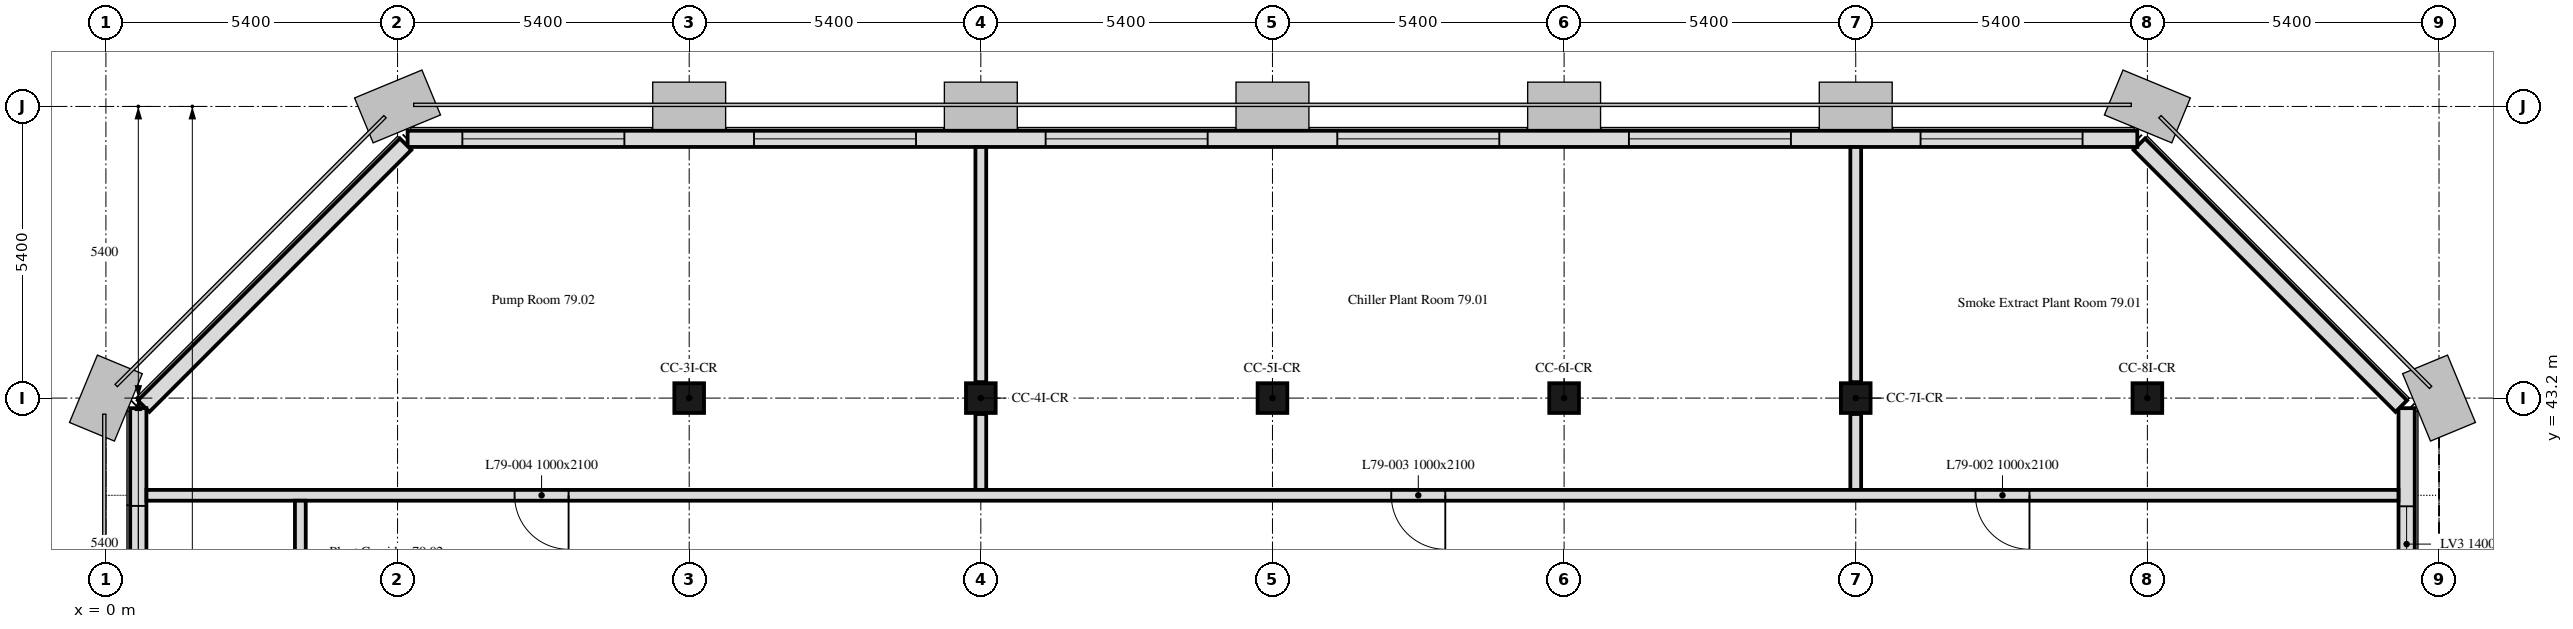
"""IFC4 building model, lengths in metres.
Left out: names, types, materials, properties, quantities, classifications, styles, units other than length and angle.
Written with IfcOpenShell. Run it as: python <this file> out.ifc"""

import sys

from ifc_helpers import new_model, si_unit, direction, frame, frame_2d, origin, origin_2d, place, context, subcontext, project, spatial, polyline, rectangle, outline, extrude, element, fill, save


model = new_model("IFC4")
c1 = context("Model", 3, precision=1e-05, world=origin(), true_north=direction((0.0, 1.0)))
c2 = subcontext(c1, "Body", "Model", "MODEL_VIEW")
j1 = project(units=[si_unit("LENGTHUNIT", "METRE"), si_unit("PLANEANGLEUNIT", "RADIAN")], contexts=[c1])
p1 = place(None, origin())
s1 = spatial("IfcSite", under=j1, at=p1, CompositionType="ELEMENT")
p2 = place(p1, origin())
s2 = spatial("IfcBuilding", under=s1, at=p2, CompositionType="ELEMENT")
p3 = place(p2, frame((0.0, 0.0, 317.2)))
s3 = spatial("IfcBuildingStorey", under=s2, at=p3, CompositionType="ELEMENT", Elevation=317.2)
for number, where, z_axis, x_axis in (
    (1, (10.8, 43.2, 0.0), (0.0, 0.0, 1.0), (1.0, 0.0, 0.0)),
    (2, (16.2, 43.2, 0.0), (0.0, 0.0, 1.0), (1.0, 0.0, 0.0)),
    (3, (21.6, 43.2, 0.0), (0.0, 0.0, 1.0), (1.0, 0.0, 0.0)),
    (4, (27.0, 43.2, 0.0), (0.0, 0.0, 1.0), (1.0, 0.0, 0.0)),
    (5, (32.4, 43.2, 0.0), (0.0, 0.0, 1.0), (1.0, 0.0, 0.0)),
    (6, (37.8, 43.2, 0.0), (0.0, 0.0, 1.0), (1.0, 0.0, 0.0)),
):
    element("IfcColumn", number, at=place(p3, frame(where, z_axis=z_axis, x_axis=x_axis)), inside=s3, PredefinedType="COLUMN", context=c2, shape_type="SweptSolid", body=[
        extrude(rectangle(XDim=0.55, YDim=0.55, at=origin_2d()), origin(), (0.0, 0.0, 1.0), 4.2),
    ])
p4 = place(p3, frame((42.6, 32.4, 0.0), z_axis=(0.0, 0.0, 1.0), x_axis=(0.0, 1.0, 0.0)))
e7 = element("IfcWall", 7, at=p4, inside=s3, PredefinedType="SOLIDWALL", context=c2, shape_type="SweptSolid", body=[
    extrude(outline(polyline([(0.0, 0.0), (10.614, 0.0), (10.614, 4.2), (10.024, 4.2), (9.434, 4.2), (8.845, 4.2), (8.255, 4.2), (7.665, 4.2), (7.076, 4.2), (6.486, 4.2), (5.896, 4.2), (5.307, 4.2), (4.717, 4.2), (4.127, 4.2), (3.538, 4.2), (2.948, 4.2), (2.359, 4.2), (1.769, 4.2), (1.179, 4.2), (0.59, 4.2), (0.0, 4.2), (0.0, 0.0)])), frame((0.0, 0.15, 0.0), z_axis=(0.0, -1.0, 0.0), x_axis=(1.0, 0.0, 0.0)), (0.0, 0.0, 1.0), 0.3),
])
p5 = place(p4, frame((1.2, 0.0, 0.6)))
e8 = element("IfcOpeningElement", 8, at=p5, cuts=e7, PredefinedType="OPENING", context=c2, shape_type="SweptSolid", body=[
    extrude(rectangle(XDim=3.0, YDim=1.8, at=frame_2d((1.5, 0.9))), frame((0.0, 0.16, 0.0), z_axis=(0.0, -1.0, 0.0), x_axis=(1.0, 0.0, 0.0)), (0.0, 0.0, 1.0), 0.32),
])
p6 = place(p4, frame((7.396, 0.0, 0.6)))
e9 = element("IfcOpeningElement", 9, at=p6, cuts=e7, PredefinedType="OPENING", context=c2, shape_type="SweptSolid", body=[
    extrude(rectangle(XDim=1.4, YDim=1.8, at=frame_2d((0.7, 0.9))), frame((0.0, 0.16, 0.0), z_axis=(0.0, -1.0, 0.0), x_axis=(1.0, 0.0, 0.0)), (0.0, 0.0, 1.0), 0.32),
])
p7 = place(p3, frame((42.501, 43.051, 0.0), z_axis=(0.0, 0.0, 1.0), x_axis=(-0.707106781187, 0.707106781187, 0.0)))
e10 = element("IfcWall", 10, at=p7, inside=s3, PredefinedType="SOLIDWALL", context=c2, shape_type="SweptSolid", body=[
    extrude(outline(polyline([(0.0, 0.0), (6.86, 0.0), (6.86, 4.2), (6.288, 4.2), (5.716, 4.2), (5.145, 4.2), (4.573, 4.2), (4.001, 4.2), (3.43, 4.2), (2.858, 4.2), (2.287, 4.2), (1.715, 4.2), (1.143, 4.2), (0.572, 4.2), (0.0, 4.2), (0.0, 0.0)])), frame((0.0, 0.15, 0.0), z_axis=(0.0, -1.0, 0.0), x_axis=(1.0, 0.0, 0.0)), (0.0, 0.0, 1.0), 0.3),
])
p8 = place(p3, frame((37.614, 48.0, 0.0), z_axis=(0.0, 0.0, 1.0), x_axis=(-1.0, 0.0, 0.0)))
e11 = element("IfcWall", 11, at=p8, inside=s3, PredefinedType="SOLIDWALL", context=c2, shape_type="SweptSolid", body=[
    extrude(outline(polyline([(0.0, 0.0), (32.027, 0.0), (32.027, 4.2), (31.434, 4.2), (30.841, 4.2), (30.248, 4.2), (29.655, 4.2), (29.062, 4.2), (28.469, 4.2), (27.875, 4.2), (27.282, 4.2), (26.689, 4.2), (26.096, 4.2), (25.503, 4.2), (24.91, 4.2), (24.317, 4.2), (23.724, 4.2), (23.131, 4.2), (22.538, 4.2), (21.945, 4.2), (21.352, 4.2), (20.758, 4.2), (20.165, 4.2), (19.572, 4.2), (18.979, 4.2), (18.386, 4.2), (17.793, 4.2), (17.2, 4.2), (16.607, 4.2), (16.014, 4.2), (15.42, 4.2), (14.827, 4.2), (14.234, 4.2), (13.641, 4.2), (13.048, 4.2), (12.455, 4.2), (11.862, 4.2), (11.269, 4.2), (10.676, 4.2), (10.083, 4.2), (9.49, 4.2), (8.896, 4.2), (8.303, 4.2), (7.71, 4.2), (7.117, 4.2), (6.524, 4.2), (5.931, 4.2), (5.338, 4.2), (4.745, 4.2), (4.152, 4.2), (3.559, 4.2), (2.966, 4.2), (2.372, 4.2), (1.779, 4.2), (1.186, 4.2), (0.593, 4.2), (0.0, 4.2), (0.0, 0.0)])), frame((0.0, 0.15, 0.0), z_axis=(0.0, -1.0, 0.0), x_axis=(1.0, 0.0, 0.0)), (0.0, 0.0, 1.0), 0.3),
])
p9 = place(p8, frame((1.014, 0.0, 0.6)))
e12 = element("IfcOpeningElement", 12, at=p9, cuts=e11, PredefinedType="OPENING", context=c2, shape_type="SweptSolid", body=[
    extrude(rectangle(XDim=3.0, YDim=1.8, at=frame_2d((1.5, 0.9))), frame((0.0, 0.16, 0.0), z_axis=(0.0, -1.0, 0.0), x_axis=(1.0, 0.0, 0.0)), (0.0, 0.0, 1.0), 0.32),
])
p10 = place(p8, frame((6.414, 0.0, 0.6)))
e13 = element("IfcOpeningElement", 13, at=p10, cuts=e11, PredefinedType="OPENING", context=c2, shape_type="SweptSolid", body=[
    extrude(rectangle(XDim=3.0, YDim=1.8, at=frame_2d((1.5, 0.9))), frame((0.0, 0.16, 0.0), z_axis=(0.0, -1.0, 0.0), x_axis=(1.0, 0.0, 0.0)), (0.0, 0.0, 1.0), 0.32),
])
p11 = place(p8, frame((11.814, 0.0, 0.6)))
e14 = element("IfcOpeningElement", 14, at=p11, cuts=e11, PredefinedType="OPENING", context=c2, shape_type="SweptSolid", body=[
    extrude(rectangle(XDim=3.0, YDim=1.8, at=frame_2d((1.5, 0.9))), frame((0.0, 0.16, 0.0), z_axis=(0.0, -1.0, 0.0), x_axis=(1.0, 0.0, 0.0)), (0.0, 0.0, 1.0), 0.32),
])
p12 = place(p8, frame((17.214, 0.0, 0.6)))
e15 = element("IfcOpeningElement", 15, at=p12, cuts=e11, PredefinedType="OPENING", context=c2, shape_type="SweptSolid", body=[
    extrude(rectangle(XDim=3.0, YDim=1.8, at=frame_2d((1.5, 0.9))), frame((0.0, 0.16, 0.0), z_axis=(0.0, -1.0, 0.0), x_axis=(1.0, 0.0, 0.0)), (0.0, 0.0, 1.0), 0.32),
])
p13 = place(p8, frame((22.614, 0.0, 0.6)))
e16 = element("IfcOpeningElement", 16, at=p13, cuts=e11, PredefinedType="OPENING", context=c2, shape_type="SweptSolid", body=[
    extrude(rectangle(XDim=3.0, YDim=1.8, at=frame_2d((1.5, 0.9))), frame((0.0, 0.16, 0.0), z_axis=(0.0, -1.0, 0.0), x_axis=(1.0, 0.0, 0.0)), (0.0, 0.0, 1.0), 0.32),
])
p14 = place(p8, frame((28.014, 0.0, 0.6)))
e17 = element("IfcOpeningElement", 17, at=p14, cuts=e11, PredefinedType="OPENING", context=c2, shape_type="SweptSolid", body=[
    extrude(rectangle(XDim=3.0, YDim=1.8, at=frame_2d((1.5, 0.9))), frame((0.0, 0.16, 0.0), z_axis=(0.0, -1.0, 0.0), x_axis=(1.0, 0.0, 0.0)), (0.0, 0.0, 1.0), 0.32),
])
p15 = place(p3, frame((5.55, 47.901, 0.0), z_axis=(0.0, 0.0, 1.0), x_axis=(-0.707106781187, -0.707106781187, 0.0)))
e18 = element("IfcWall", 18, at=p15, inside=s3, PredefinedType="SOLIDWALL", context=c2, shape_type="SweptSolid", body=[
    extrude(outline(polyline([(0.0, 0.0), (6.86, 0.0), (6.86, 4.2), (6.288, 4.2), (5.716, 4.2), (5.145, 4.2), (4.573, 4.2), (4.001, 4.2), (3.43, 4.2), (2.858, 4.2), (2.287, 4.2), (1.715, 4.2), (1.143, 4.2), (0.572, 4.2), (0.0, 4.2), (0.0, 0.0)])), frame((0.0, 0.15, 0.0), z_axis=(0.0, -1.0, 0.0), x_axis=(1.0, 0.0, 0.0)), (0.0, 0.0, 1.0), 0.3),
])
p16 = place(p3, frame((0.6, 43.014, 0.0), z_axis=(0.0, 0.0, 1.0), x_axis=(0.0, -1.0, 0.0)))
e19 = element("IfcWall", 19, at=p16, inside=s3, PredefinedType="SOLIDWALL", context=c2, shape_type="SweptSolid", body=[
    extrude(outline(polyline([(0.0, 0.0), (32.027, 0.0), (32.027, 4.2), (31.434, 4.2), (30.841, 4.2), (30.248, 4.2), (29.655, 4.2), (29.062, 4.2), (28.469, 4.2), (27.875, 4.2), (27.282, 4.2), (26.689, 4.2), (26.096, 4.2), (25.503, 4.2), (24.91, 4.2), (24.317, 4.2), (23.724, 4.2), (23.131, 4.2), (22.538, 4.2), (21.945, 4.2), (21.352, 4.2), (20.758, 4.2), (20.165, 4.2), (19.572, 4.2), (18.979, 4.2), (18.386, 4.2), (17.793, 4.2), (17.2, 4.2), (16.607, 4.2), (16.014, 4.2), (15.42, 4.2), (14.827, 4.2), (14.234, 4.2), (13.641, 4.2), (13.048, 4.2), (12.455, 4.2), (11.862, 4.2), (11.269, 4.2), (10.676, 4.2), (10.083, 4.2), (9.49, 4.2), (8.896, 4.2), (8.303, 4.2), (7.71, 4.2), (7.117, 4.2), (6.524, 4.2), (5.931, 4.2), (5.338, 4.2), (4.745, 4.2), (4.152, 4.2), (3.559, 4.2), (2.966, 4.2), (2.372, 4.2), (1.779, 4.2), (1.186, 4.2), (0.593, 4.2), (0.0, 4.2), (0.0, 0.0)])), frame((0.0, 0.15, 0.0), z_axis=(0.0, -1.0, 0.0), x_axis=(1.0, 0.0, 0.0)), (0.0, 0.0, 1.0), 0.3),
])
p17 = place(p16, frame((1.81, 0.0, 0.6)))
e20 = element("IfcOpeningElement", 20, at=p17, cuts=e19, PredefinedType="OPENING", context=c2, shape_type="SweptSolid", body=[
    extrude(rectangle(XDim=3.0, YDim=1.8, at=frame_2d((1.5, 0.9))), frame((0.0, 0.16, 0.0), z_axis=(0.0, -1.0, 0.0), x_axis=(1.0, 0.0, 0.0)), (0.0, 0.0, 1.0), 0.32),
])
p18 = place(p16, frame((6.414, 0.0, 0.6)))
e21 = element("IfcOpeningElement", 21, at=p18, cuts=e19, PredefinedType="OPENING", context=c2, shape_type="SweptSolid", body=[
    extrude(rectangle(XDim=3.0, YDim=1.8, at=frame_2d((1.5, 0.9))), frame((0.0, 0.16, 0.0), z_axis=(0.0, -1.0, 0.0), x_axis=(1.0, 0.0, 0.0)), (0.0, 0.0, 1.0), 0.32),
])
p19 = place(p16, frame((11.814, 0.0, 0.6)))
e22 = element("IfcOpeningElement", 22, at=p19, cuts=e19, PredefinedType="OPENING", context=c2, shape_type="SweptSolid", body=[
    extrude(rectangle(XDim=3.0, YDim=1.8, at=frame_2d((1.5, 0.9))), frame((0.0, 0.16, 0.0), z_axis=(0.0, -1.0, 0.0), x_axis=(1.0, 0.0, 0.0)), (0.0, 0.0, 1.0), 0.32),
])
p20 = place(p16, frame((17.214, 0.0, 0.6)))
e23 = element("IfcOpeningElement", 23, at=p20, cuts=e19, PredefinedType="OPENING", context=c2, shape_type="SweptSolid", body=[
    extrude(rectangle(XDim=3.0, YDim=1.8, at=frame_2d((1.5, 0.9))), frame((0.0, 0.16, 0.0), z_axis=(0.0, -1.0, 0.0), x_axis=(1.0, 0.0, 0.0)), (0.0, 0.0, 1.0), 0.32),
])
p21 = place(p16, frame((22.614, 0.0, 0.6)))
e24 = element("IfcOpeningElement", 24, at=p21, cuts=e19, PredefinedType="OPENING", context=c2, shape_type="SweptSolid", body=[
    extrude(rectangle(XDim=3.0, YDim=1.8, at=frame_2d((1.5, 0.9))), frame((0.0, 0.16, 0.0), z_axis=(0.0, -1.0, 0.0), x_axis=(1.0, 0.0, 0.0)), (0.0, 0.0, 1.0), 0.32),
])
p22 = place(p16, frame((28.014, 0.0, 0.6)))
e25 = element("IfcOpeningElement", 25, at=p22, cuts=e19, PredefinedType="OPENING", context=c2, shape_type="SweptSolid", body=[
    extrude(rectangle(XDim=3.0, YDim=1.8, at=frame_2d((1.5, 0.9))), frame((0.0, 0.16, 0.0), z_axis=(0.0, -1.0, 0.0), x_axis=(1.0, 0.0, 0.0)), (0.0, 0.0, 1.0), 0.32),
])
p23 = place(p3, frame((32.4, 47.849, 0.0), z_axis=(0.0, 0.0, 1.0), x_axis=(0.0, -1.0, 0.0)))
e26 = element("IfcWall", 26, at=p23, inside=s3, PredefinedType="PARTITIONING", context=c2, shape_type="SweptSolid", body=[
    extrude(rectangle(XDim=4.354, YDim=0.2, at=frame_2d((2.177, 0.0))), origin(), (0.0, 0.0, 1.0), 3.45),
])
p24 = place(p3, frame((32.4, 42.905, 0.0), z_axis=(0.0, 0.0, 1.0), x_axis=(0.0, -1.0, 0.0)))
e27 = element("IfcWall", 27, at=p24, inside=s3, PredefinedType="PARTITIONING", context=c2, shape_type="SweptSolid", body=[
    extrude(rectangle(XDim=1.405, YDim=0.2, at=frame_2d((0.703, 0.0))), origin(), (0.0, 0.0, 1.0), 3.45),
])
p25 = place(p3, frame((16.2, 47.849, 0.0), z_axis=(0.0, 0.0, 1.0), x_axis=(0.0, -1.0, 0.0)))
e28 = element("IfcWall", 28, at=p25, inside=s3, PredefinedType="PARTITIONING", context=c2, shape_type="SweptSolid", body=[
    extrude(rectangle(XDim=4.354, YDim=0.2, at=frame_2d((2.177, 0.0))), origin(), (0.0, 0.0, 1.0), 3.45),
])
p26 = place(p3, frame((16.2, 42.905, 0.0), z_axis=(0.0, 0.0, 1.0), x_axis=(0.0, -1.0, 0.0)))
e29 = element("IfcWall", 29, at=p26, inside=s3, PredefinedType="PARTITIONING", context=c2, shape_type="SweptSolid", body=[
    extrude(rectangle(XDim=1.405, YDim=0.2, at=frame_2d((0.703, 0.0))), origin(), (0.0, 0.0, 1.0), 3.45),
])
p27 = place(p3, frame((42.449, 41.4, 0.0), z_axis=(0.0, 0.0, 1.0), x_axis=(-1.0, 0.0, 0.0)))
e30 = element("IfcWall", 30, at=p27, inside=s3, PredefinedType="PARTITIONING", context=c2, shape_type="SweptSolid", body=[
    extrude(rectangle(XDim=41.698, YDim=0.2, at=frame_2d((20.849, 0.0))), origin(), (0.0, 0.0, 1.0), 3.45),
])
p28 = place(p27, frame((6.832, 0.0, 0.0)))
e31 = element("IfcOpeningElement", 31, at=p28, cuts=e30, PredefinedType="OPENING", context=c2, shape_type="SweptSolid", body=[
    extrude(rectangle(XDim=1.0, YDim=2.1, at=frame_2d((0.5, 1.05))), frame((0.0, 0.1, 0.0), z_axis=(0.0, -1.0, 0.0), x_axis=(1.0, 0.0, 0.0)), (0.0, 0.0, 1.0), 0.2),
])
p29 = place(p27, frame((17.649, 0.0, 0.0)))
e32 = element("IfcOpeningElement", 32, at=p29, cuts=e30, PredefinedType="OPENING", context=c2, shape_type="SweptSolid", body=[
    extrude(rectangle(XDim=1.0, YDim=2.1, at=frame_2d((0.5, 1.05))), frame((0.0, 0.1, 0.0), z_axis=(0.0, -1.0, 0.0), x_axis=(1.0, 0.0, 0.0)), (0.0, 0.0, 1.0), 0.2),
])
p30 = place(p27, frame((33.882, 0.0, 0.0)))
e33 = element("IfcOpeningElement", 33, at=p30, cuts=e30, PredefinedType="OPENING", context=c2, shape_type="SweptSolid", body=[
    extrude(rectangle(XDim=1.0, YDim=2.1, at=frame_2d((0.5, 1.05))), frame((0.0, 0.1, 0.0), z_axis=(0.0, -1.0, 0.0), x_axis=(1.0, 0.0, 0.0)), (0.0, 0.0, 1.0), 0.2),
])
p31 = place(p3, frame((3.6, 11.35, 0.0), z_axis=(0.0, 0.0, 1.0), x_axis=(0.0, 1.0, 0.0)))
e34 = element("IfcWall", 34, at=p31, inside=s3, PredefinedType="PARTITIONING", context=c2, shape_type="SweptSolid", body=[
    extrude(rectangle(XDim=29.95, YDim=0.2, at=frame_2d((14.975, 0.0))), origin(), (0.0, 0.0, 1.0), 3.45),
])
p32 = place(p31, frame((23.508, 0.0, 0.0)))
e35 = element("IfcOpeningElement", 35, at=p32, cuts=e34, PredefinedType="OPENING", context=c2, shape_type="SweptSolid", body=[
    extrude(rectangle(XDim=1.0, YDim=2.1, at=frame_2d((0.5, 1.05))), frame((0.0, 0.1, 0.0), z_axis=(0.0, -1.0, 0.0), x_axis=(1.0, 0.0, 0.0)), (0.0, 0.0, 1.0), 0.2),
])
p33 = place(p31, frame((17.85, 0.0, 0.0)))
e36 = element("IfcOpeningElement", 36, at=p33, cuts=e34, PredefinedType="OPENING", context=c2, shape_type="SweptSolid", body=[
    extrude(rectangle(XDim=1.0, YDim=2.1, at=frame_2d((0.5, 1.05))), frame((0.0, 0.1, 0.0), z_axis=(0.0, -1.0, 0.0), x_axis=(1.0, 0.0, 0.0)), (0.0, 0.0, 1.0), 0.2),
])
p34 = place(p31, frame((1.875, 0.0, 0.0)))
e37 = element("IfcOpeningElement", 37, at=p34, cuts=e34, PredefinedType="OPENING", context=c2, shape_type="SweptSolid", body=[
    extrude(rectangle(XDim=1.0, YDim=2.1, at=frame_2d((0.5, 1.05))), frame((0.0, 0.1, 0.0), z_axis=(0.0, -1.0, 0.0), x_axis=(1.0, 0.0, 0.0)), (0.0, 0.0, 1.0), 0.2),
])
p35 = place(p31, frame((9.75, 0.0, 0.0)))
e38 = element("IfcOpeningElement", 38, at=p35, cuts=e34, PredefinedType="OPENING", context=c2, shape_type="SweptSolid", body=[
    extrude(rectangle(XDim=1.0, YDim=2.1, at=frame_2d((0.5, 1.05))), frame((0.0, 0.1, 0.0), z_axis=(0.0, -1.0, 0.0), x_axis=(1.0, 0.0, 0.0)), (0.0, 0.0, 1.0), 0.2),
])
p36 = place(p6, origin())
e39 = element("IfcWindow", 39, at=p36, inside=s3, PartitioningType="SINGLE_PANEL", PredefinedType="WINDOW", context=c2, shape_type="SweptSolid", body=[
    extrude(rectangle(XDim=1.4, YDim=1.8, at=frame_2d((0.7, 0.9))), frame((0.0, 0.03, 0.0), z_axis=(0.0, -1.0, 0.0), x_axis=(1.0, 0.0, 0.0)), (0.0, 0.0, 1.0), 0.06),
])
fill(e9, e39)
p37 = place(p9, origin())
e40 = element("IfcWindow", 40, at=p37, inside=s3, PartitioningType="SINGLE_PANEL", PredefinedType="WINDOW", context=c2, shape_type="SweptSolid", body=[
    extrude(rectangle(XDim=3.0, YDim=1.8, at=frame_2d((1.5, 0.9))), frame((0.0, 0.03, 0.0), z_axis=(0.0, -1.0, 0.0), x_axis=(1.0, 0.0, 0.0)), (0.0, 0.0, 1.0), 0.06),
])
fill(e12, e40)
p38 = place(p10, origin())
e41 = element("IfcWindow", 41, at=p38, inside=s3, PartitioningType="SINGLE_PANEL", PredefinedType="WINDOW", context=c2, shape_type="SweptSolid", body=[
    extrude(rectangle(XDim=3.0, YDim=1.8, at=frame_2d((1.5, 0.9))), frame((0.0, 0.03, 0.0), z_axis=(0.0, -1.0, 0.0), x_axis=(1.0, 0.0, 0.0)), (0.0, 0.0, 1.0), 0.06),
])
fill(e13, e41)
p39 = place(p11, origin())
e42 = element("IfcWindow", 42, at=p39, inside=s3, PartitioningType="SINGLE_PANEL", PredefinedType="WINDOW", context=c2, shape_type="SweptSolid", body=[
    extrude(rectangle(XDim=3.0, YDim=1.8, at=frame_2d((1.5, 0.9))), frame((0.0, 0.03, 0.0), z_axis=(0.0, -1.0, 0.0), x_axis=(1.0, 0.0, 0.0)), (0.0, 0.0, 1.0), 0.06),
])
fill(e14, e42)
p40 = place(p12, origin())
e43 = element("IfcWindow", 43, at=p40, inside=s3, PartitioningType="SINGLE_PANEL", PredefinedType="WINDOW", context=c2, shape_type="SweptSolid", body=[
    extrude(rectangle(XDim=3.0, YDim=1.8, at=frame_2d((1.5, 0.9))), frame((0.0, 0.03, 0.0), z_axis=(0.0, -1.0, 0.0), x_axis=(1.0, 0.0, 0.0)), (0.0, 0.0, 1.0), 0.06),
])
fill(e15, e43)
p41 = place(p13, origin())
e44 = element("IfcWindow", 44, at=p41, inside=s3, PartitioningType="SINGLE_PANEL", PredefinedType="WINDOW", context=c2, shape_type="SweptSolid", body=[
    extrude(rectangle(XDim=3.0, YDim=1.8, at=frame_2d((1.5, 0.9))), frame((0.0, 0.03, 0.0), z_axis=(0.0, -1.0, 0.0), x_axis=(1.0, 0.0, 0.0)), (0.0, 0.0, 1.0), 0.06),
])
fill(e16, e44)
p42 = place(p14, origin())
e45 = element("IfcWindow", 45, at=p42, inside=s3, PartitioningType="SINGLE_PANEL", PredefinedType="WINDOW", context=c2, shape_type="SweptSolid", body=[
    extrude(rectangle(XDim=3.0, YDim=1.8, at=frame_2d((1.5, 0.9))), frame((0.0, 0.03, 0.0), z_axis=(0.0, -1.0, 0.0), x_axis=(1.0, 0.0, 0.0)), (0.0, 0.0, 1.0), 0.06),
])
fill(e17, e45)
p43 = place(p17, origin())
e46 = element("IfcWindow", 46, at=p43, inside=s3, PartitioningType="SINGLE_PANEL", PredefinedType="WINDOW", context=c2, shape_type="SweptSolid", body=[
    extrude(rectangle(XDim=3.0, YDim=1.8, at=frame_2d((1.5, 0.9))), frame((0.0, 0.03, 0.0), z_axis=(0.0, -1.0, 0.0), x_axis=(1.0, 0.0, 0.0)), (0.0, 0.0, 1.0), 0.06),
])
fill(e20, e46)
p44 = place(p28, origin())
e47 = element("IfcDoor", 47, at=p44, inside=s3, OperationType="SINGLE_SWING_RIGHT", PredefinedType="DOOR", context=c2, shape_type="SweptSolid", body=[
    extrude(rectangle(XDim=1.0, YDim=2.1, at=frame_2d((0.5, 1.05))), frame((0.0, 0.025, 0.0), z_axis=(0.0, -1.0, 0.0), x_axis=(1.0, 0.0, 0.0)), (0.0, 0.0, 1.0), 0.05),
])
fill(e31, e47)
p45 = place(p29, origin())
e48 = element("IfcDoor", 48, at=p45, inside=s3, OperationType="SINGLE_SWING_LEFT", PredefinedType="DOOR", context=c2, shape_type="SweptSolid", body=[
    extrude(rectangle(XDim=1.0, YDim=2.1, at=frame_2d((0.5, 1.05))), frame((0.0, 0.025, 0.0), z_axis=(0.0, -1.0, 0.0), x_axis=(1.0, 0.0, 0.0)), (0.0, 0.0, 1.0), 0.05),
])
fill(e32, e48)
p46 = place(p30, origin())
e49 = element("IfcDoor", 49, at=p46, inside=s3, OperationType="SINGLE_SWING_LEFT", PredefinedType="DOOR", context=c2, shape_type="SweptSolid", body=[
    extrude(rectangle(XDim=1.0, YDim=2.1, at=frame_2d((0.5, 1.05))), frame((0.0, 0.025, 0.0), z_axis=(0.0, -1.0, 0.0), x_axis=(1.0, 0.0, 0.0)), (0.0, 0.0, 1.0), 0.05),
])
fill(e33, e49)
save(model, sys.argv[1])
